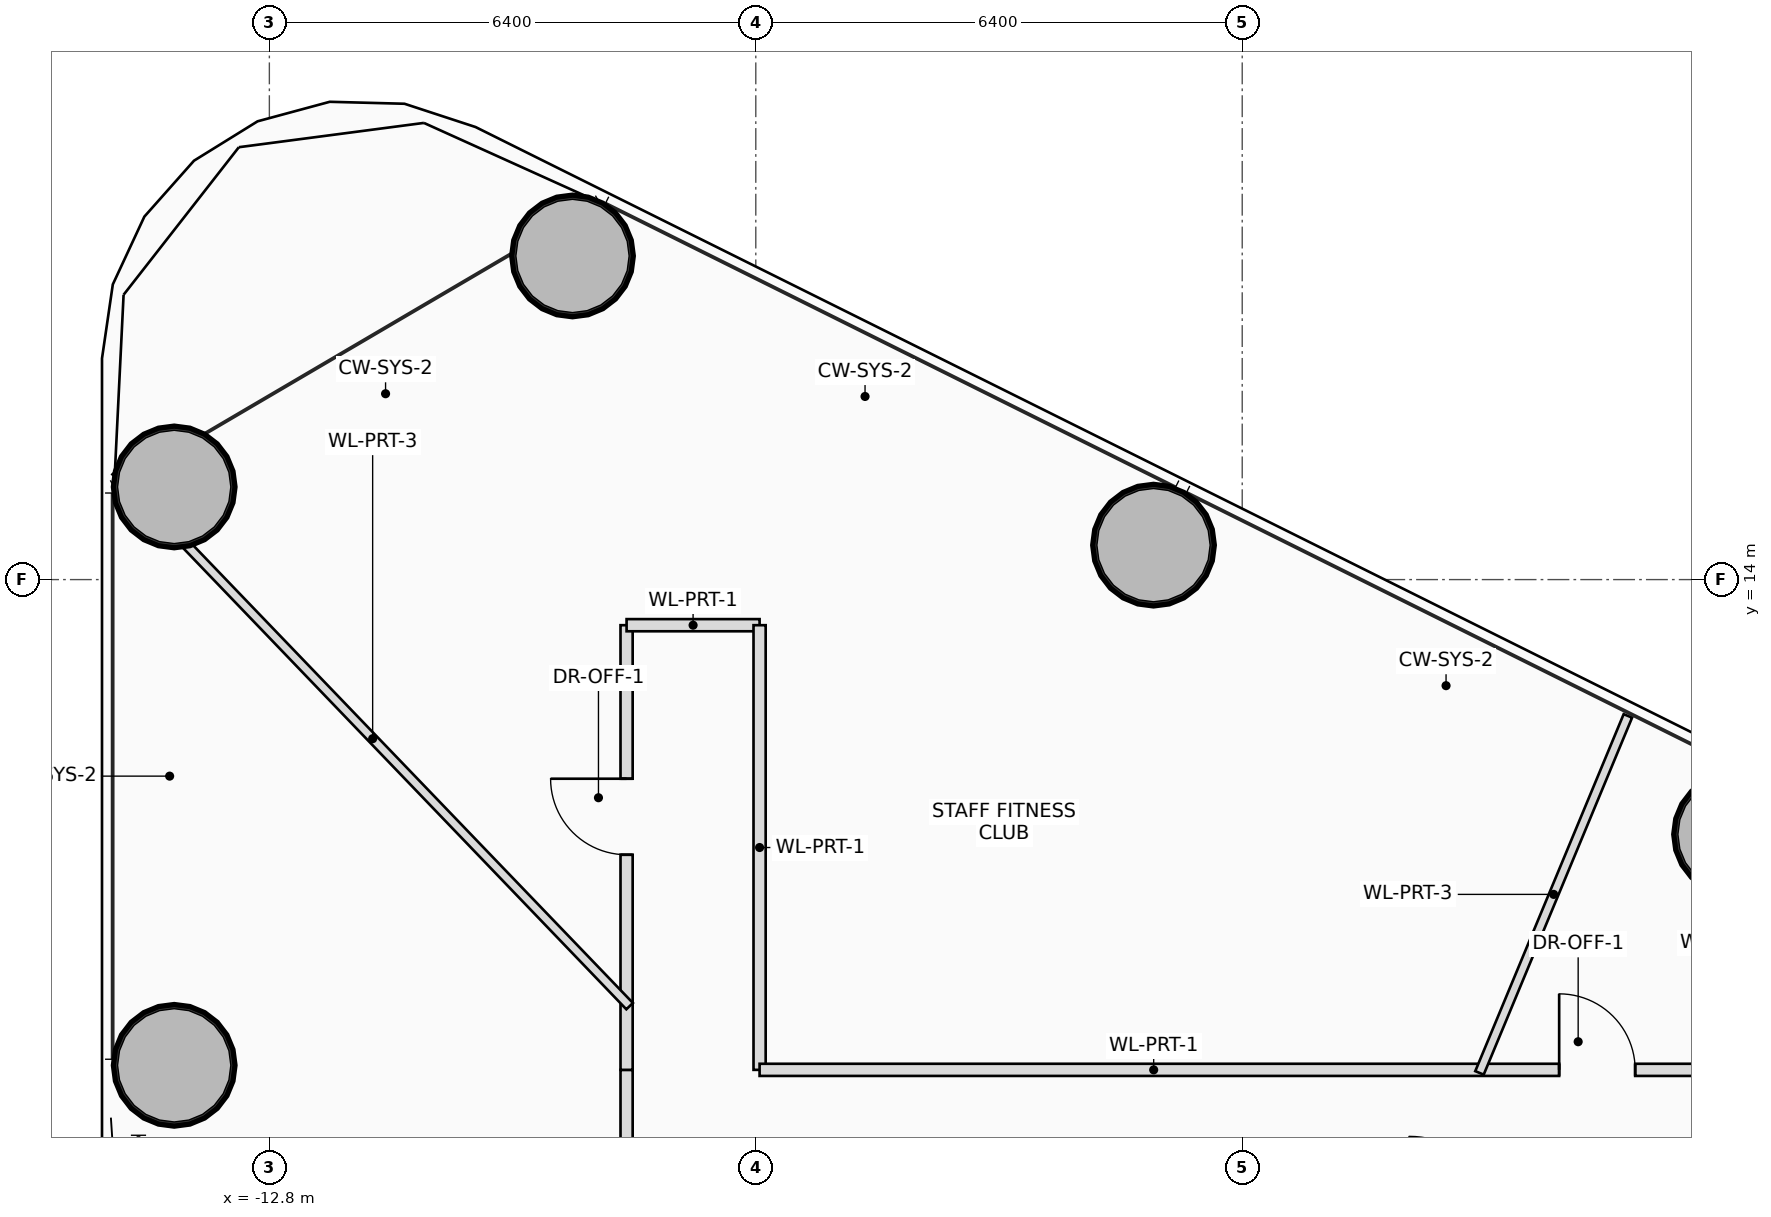
"""IFC4 building model, lengths in metres.
Left out: names, types, materials, properties, quantities, classifications, styles, units other than length and angle.
Written with IfcOpenShell. Run it as: python <this file> out.ifc"""

import sys

from ifc_helpers import new_model, si_unit, direction, frame, frame_2d, origin, origin_2d, place, context, subcontext, project, spatial, rectangle, hollow_circle, extrude, source, transform, mapped, element, fill, save


model = new_model("IFC4")
c1 = context("Model", 3, precision=1e-05, world=origin(), true_north=direction((0.0, 1.0)))
c2 = subcontext(c1, "Body", "Model", "MODEL_VIEW")
j1 = project(units=[si_unit("LENGTHUNIT", "METRE"), si_unit("PLANEANGLEUNIT", "RADIAN")], contexts=[c1])
p1 = place(None, origin())
s1 = spatial("IfcSite", under=j1, at=p1, CompositionType="ELEMENT")
p2 = place(p1, origin())
s2 = spatial("IfcBuilding", under=s1, at=p2, CompositionType="ELEMENT")
p3 = place(p2, frame((0.0, 0.0, 34.9)))
s3 = spatial("IfcBuildingStorey", under=s2, at=p3, CompositionType="ELEMENT", Elevation=34.9)
m1 = source(origin(), c2, "Body", "SweptSolid", [
    extrude(hollow_circle(Radius=0.8, WallThickness=0.055, at=origin_2d()), origin(), (0.0, 0.0, 1.0), 3.7),
])
for number, where, z_axis, x_axis in (
    (1, (6.477, 10.648, 0.0), (0.0, 0.0, 1.0), (1.0, 0.0, 0.0)),
    (2, (-1.167, 14.453, 0.0), (0.0, 0.0, 1.0), (1.0, 0.0, 0.0)),
    (3, (-8.812, 18.258, 0.0), (0.0, 0.0, 1.0), (1.0, 0.0, 0.0)),
    (4, (-14.052, 15.219, 0.0), (0.0, 0.0, 1.0), (1.0, 0.0, 0.0)),
    (5, (-14.052, 7.61, 0.0), (0.0, 0.0, 1.0), (1.0, 0.0, 0.0)),
):
    element("IfcColumn", number, at=place(p3, frame(where, z_axis=z_axis, x_axis=x_axis)), inside=s3, PredefinedType="COLUMN", context=c2, shape_type="MappedRepresentation", body=[
        mapped(m1, transform((0.0, 0.0, 0.0), scale=1.0)),
    ])
p4 = place(p3, frame((-8.1, -7.55, 0.0), z_axis=(0.0, 0.0, 1.0), x_axis=(0.0, 1.0, 0.0)))
e6 = element("IfcWall", 6, at=p4, inside=s3, PredefinedType="PARTITIONING", context=c2, shape_type="SweptSolid", body=[
    extrude(rectangle(XDim=15.1, YDim=0.16, at=frame_2d((7.55, 0.0))), origin(), (0.0, 0.0, 1.0), 2.8),
])
p5 = place(p4, frame((11.285, 0.0, 0.0)))
e7 = element("IfcOpeningElement", 7, at=p5, cuts=e6, PredefinedType="OPENING", context=c2, shape_type="SweptSolid", body=[
    extrude(rectangle(XDim=1.0, YDim=2.25, at=frame_2d((0.5, 1.125))), frame((0.0, 0.09, 0.0), z_axis=(0.0, -1.0, 0.0), x_axis=(1.0, 0.0, 0.0)), (0.0, 0.0, 1.0), 0.18),
])
p6 = place(p3, frame((-8.1, 7.55, 0.0), z_axis=(0.0, 0.0, 1.0), x_axis=(0.0, 1.0, 0.0)))
e8 = element("IfcWall", 8, at=p6, inside=s3, PredefinedType="PARTITIONING", context=c2, shape_type="SweptSolid", body=[
    extrude(rectangle(XDim=5.85, YDim=0.16, at=frame_2d((2.925, 0.0))), origin(), (0.0, 0.0, 1.0), 2.8),
])
p7 = place(p6, frame((2.83, 0.0, 0.0)))
e9 = element("IfcOpeningElement", 9, at=p7, cuts=e8, PredefinedType="OPENING", context=c2, shape_type="SweptSolid", body=[
    extrude(rectangle(XDim=1.0, YDim=2.25, at=frame_2d((0.5, 1.125))), frame((0.0, 0.09, 0.0), z_axis=(0.0, -1.0, 0.0), x_axis=(1.0, 0.0, 0.0)), (0.0, 0.0, 1.0), 0.18),
])
p8 = place(p3, frame((-8.1, 13.4, 0.0), z_axis=(0.0, 0.0, 1.0), x_axis=(1.0, 0.0, 0.0)))
e10 = element("IfcWall", 10, at=p8, inside=s3, PredefinedType="PARTITIONING", context=c2, shape_type="SweptSolid", body=[
    extrude(rectangle(XDim=1.75, YDim=0.16, at=frame_2d((0.875, 0.0))), origin(), (0.0, 0.0, 1.0), 2.8),
])
p9 = place(p3, frame((-6.35, 13.4, 0.0), z_axis=(0.0, 0.0, 1.0), x_axis=(0.0, -1.0, 0.0)))
e11 = element("IfcWall", 11, at=p9, inside=s3, PredefinedType="PARTITIONING", context=c2, shape_type="SweptSolid", body=[
    extrude(rectangle(XDim=5.85, YDim=0.16, at=frame_2d((2.925, 0.0))), origin(), (0.0, 0.0, 1.0), 2.8),
])
p10 = place(p3, frame((-6.35, 7.55, 0.0), z_axis=(0.0, 0.0, 1.0), x_axis=(1.0, 0.0, 0.0)))
e12 = element("IfcWall", 12, at=p10, inside=s3, PredefinedType="PARTITIONING", context=c2, shape_type="SweptSolid", body=[
    extrude(rectangle(XDim=12.7, YDim=0.16, at=frame_2d((6.35, 0.0))), origin(), (0.0, 0.0, 1.0), 2.8),
])
p11 = place(p10, frame((10.52, 0.0, 0.0)))
e13 = element("IfcOpeningElement", 13, at=p11, cuts=e12, PredefinedType="OPENING", context=c2, shape_type="SweptSolid", body=[
    extrude(rectangle(XDim=1.0, YDim=2.25, at=frame_2d((0.5, 1.125))), frame((0.0, 0.09, 0.0), z_axis=(0.0, -1.0, 0.0), x_axis=(1.0, 0.0, 0.0)), (0.0, 0.0, 1.0), 0.18),
])
p12 = place(p3, frame((3.122, 7.51, 0.0), z_axis=(0.0, 0.0, 1.0), x_axis=(0.383885926118, 0.923380525963, 0.0)))
e14 = element("IfcWall", 14, at=p12, inside=s3, PredefinedType="PARTITIONING", context=c2, shape_type="SweptSolid", body=[
    extrude(rectangle(XDim=5.086, YDim=0.12, at=frame_2d((2.543, 0.0))), origin(), (0.0, 0.0, 1.0), 2.96),
])
p13 = place(p3, frame((-8.06, 8.388, 0.0), z_axis=(0.0, 0.0, 1.0), x_axis=(-0.692869708489, 0.721062803823, 0.0)))
e15 = element("IfcWall", 15, at=p13, inside=s3, PredefinedType="PARTITIONING", context=c2, shape_type="SweptSolid", body=[
    extrude(rectangle(XDim=9.759, YDim=0.12, at=frame_2d((4.88, 0.0))), origin(), (0.0, 0.0, 1.0), 2.8),
])
p14 = place(p7, origin())
e16 = element("IfcDoor", 16, at=p14, inside=s3, OperationType="SINGLE_SWING_RIGHT", PredefinedType="DOOR", context=c2, shape_type="SweptSolid", body=[
    extrude(rectangle(XDim=1.0, YDim=2.25, at=frame_2d((0.5, 1.125))), frame((0.0, 0.025, 0.0), z_axis=(0.0, -1.0, 0.0), x_axis=(1.0, 0.0, 0.0)), (0.0, 0.0, 1.0), 0.05),
])
fill(e9, e16)
p15 = place(p11, origin())
e17 = element("IfcDoor", 17, at=p15, inside=s3, OperationType="SINGLE_SWING_LEFT", PredefinedType="DOOR", context=c2, shape_type="SweptSolid", body=[
    extrude(rectangle(XDim=1.0, YDim=2.25, at=frame_2d((0.5, 1.125))), frame((0.0, 0.025, 0.0), z_axis=(0.0, -1.0, 0.0), x_axis=(1.0, 0.0, 0.0)), (0.0, 0.0, 1.0), 0.05),
])
fill(e13, e17)
save(model, sys.argv[1])
